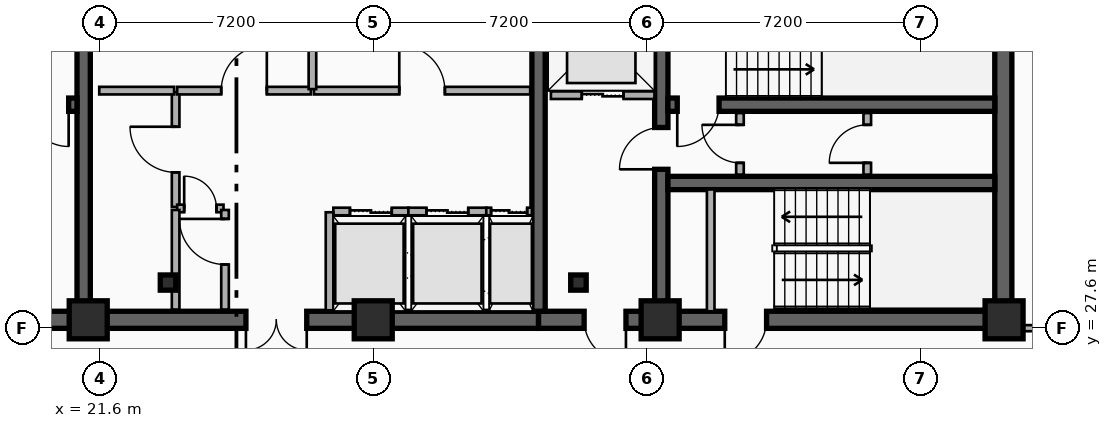
"""IFC4 building model, lengths in metres.
Left out: names, types, materials, properties, quantities, classifications, styles, units other than length and angle.
Written with IfcOpenShell. Run it as: python <this file> out.ifc"""

import sys

from ifc_helpers import new_model, si_unit, direction, frame, frame_2d, origin, origin_2d, place, context, subcontext, project, spatial, rectangle, i_section, extrude, element, fill, save


model = new_model("IFC4")
c1 = context("Model", 3, precision=1e-05, world=origin(), true_north=direction((0.0, 1.0)))
c2 = subcontext(c1, "Body", "Model", "MODEL_VIEW")
j1 = project(units=[si_unit("LENGTHUNIT", "METRE"), si_unit("PLANEANGLEUNIT", "RADIAN")], contexts=[c1])
p1 = place(None, origin())
s1 = spatial("IfcSite", under=j1, at=p1, CompositionType="ELEMENT")
p2 = place(p1, origin())
s2 = spatial("IfcBuilding", under=s1, at=p2, CompositionType="ELEMENT")
p3 = place(p2, frame((0.0, 0.0, 207.6)))
s3 = spatial("IfcBuildingStorey", under=s2, at=p3, CompositionType="ELEMENT", Elevation=207.6)
p4 = place(p3, frame((21.18, 27.82, 0.0), z_axis=(0.0, 0.0, 1.0), x_axis=(-1.0, 0.0, 0.0)))
e1 = element("IfcWall", 1, at=p4, inside=s3, PredefinedType="SHEAR", context=c2, shape_type="SweptSolid", body=[
    extrude(rectangle(XDim=9.03, YDim=0.45, at=frame_2d((4.515, 0.0))), origin(), (0.0, 0.0, 1.0), 3.6),
])
p5 = place(p4, frame((2.68, 0.0, 0.0)))
e2 = element("IfcOpeningElement", 2, at=p5, cuts=e1, PredefinedType="OPENING", context=c2, shape_type="SweptSolid", body=[
    extrude(rectangle(XDim=1.1, YDim=2.15, at=frame_2d((0.55, 1.075))), frame((0.0, 0.235, 0.0), z_axis=(0.0, -1.0, 0.0), x_axis=(1.0, 0.0, 0.0)), (0.0, 0.0, 1.0), 0.47),
])
p6 = place(p3, frame((33.15, 27.82, 0.0), z_axis=(0.0, 0.0, 1.0), x_axis=(-1.0, 0.0, 0.0)))
e3 = element("IfcWall", 3, at=p6, inside=s3, PredefinedType="SHEAR", context=c2, shape_type="SweptSolid", body=[
    extrude(rectangle(XDim=11.97, YDim=0.45, at=frame_2d((5.985, 0.0))), origin(), (0.0, 0.0, 1.0), 3.6),
])
p7 = place(p6, frame((6.1, 0.0, 0.0)))
e4 = element("IfcOpeningElement", 4, at=p7, cuts=e3, PredefinedType="OPENING", context=c2, shape_type="SweptSolid", body=[
    extrude(rectangle(XDim=1.6, YDim=2.2, at=frame_2d((0.8, 1.1))), frame((0.0, 0.235, 0.0), z_axis=(0.0, -1.0, 0.0), x_axis=(1.0, 0.0, 0.0)), (0.0, 0.0, 1.0), 0.47),
])
p8 = place(p3, frame((45.38, 27.82, 0.0), z_axis=(0.0, 0.0, 1.0), x_axis=(-1.0, 0.0, 0.0)))
e5 = element("IfcWall", 5, at=p8, inside=s3, PredefinedType="SHEAR", context=c2, shape_type="SweptSolid", body=[
    extrude(rectangle(XDim=12.23, YDim=0.45, at=frame_2d((6.115, 0.0))), origin(), (0.0, 0.0, 1.0), 3.6),
])
p9 = place(p8, frame((9.93, 0.0, 0.0)))
e6 = element("IfcOpeningElement", 6, at=p9, cuts=e5, PredefinedType="OPENING", context=c2, shape_type="SweptSolid", body=[
    extrude(rectangle(XDim=1.1, YDim=2.15, at=frame_2d((0.55, 1.075))), frame((0.0, 0.235, 0.0), z_axis=(0.0, -1.0, 0.0), x_axis=(1.0, 0.0, 0.0)), (0.0, 0.0, 1.0), 0.47),
])
p10 = place(p8, frame((6.23, 0.0, 0.0)))
e7 = element("IfcOpeningElement", 7, at=p10, cuts=e5, PredefinedType="OPENING", context=c2, shape_type="SweptSolid", body=[
    extrude(rectangle(XDim=1.1, YDim=2.15, at=frame_2d((0.55, 1.075))), frame((0.0, 0.235, 0.0), z_axis=(0.0, -1.0, 0.0), x_axis=(1.0, 0.0, 0.0)), (0.0, 0.0, 1.0), 0.47),
])
p11 = place(p3, frame((45.38, 28.045, 0.0), z_axis=(0.0, 0.0, 1.0), x_axis=(0.0, 1.0, 0.0)))
e8 = element("IfcWall", 8, at=p11, inside=s3, PredefinedType="SHEAR", context=c2, shape_type="SweptSolid", body=[
    extrude(rectangle(XDim=8.78, YDim=0.45, at=frame_2d((4.39, 0.0))), origin(), (0.0, 0.0, 1.0), 3.6),
])
for number, where, z_axis, x_axis in (
    (9, (21.18, 28.045, 0.0), (0.0, 0.0, 1.0), (0.0, 1.0, 0.0)),
    (10, (33.15, 28.045, 0.0), (0.0, 0.0, 1.0), (0.0, 1.0, 0.0)),
):
    element("IfcWall", number, at=place(p3, frame(where, z_axis=z_axis, x_axis=x_axis)), inside=s3, PredefinedType="SHEAR", context=c2, shape_type="SweptSolid", body=[
        extrude(rectangle(XDim=8.78, YDim=0.35, at=frame_2d((4.39, 0.0))), origin(), (0.0, 0.0, 1.0), 3.6),
    ])
p12 = place(p3, frame((36.38, 28.045, 0.0), z_axis=(0.0, 0.0, 1.0), x_axis=(0.0, 1.0, 0.0)))
e11 = element("IfcWall", 11, at=p12, inside=s3, PredefinedType="SHEAR", context=c2, shape_type="SweptSolid", body=[
    extrude(rectangle(XDim=8.78, YDim=0.35, at=frame_2d((4.39, 0.0))), origin(), (0.0, 0.0, 1.0), 3.6),
])
p13 = place(p12, frame((3.735, 0.0, 0.0)))
e12 = element("IfcOpeningElement", 12, at=p13, cuts=e11, PredefinedType="OPENING", context=c2, shape_type="SweptSolid", body=[
    extrude(rectangle(XDim=1.1, YDim=2.15, at=frame_2d((0.55, 1.075))), frame((0.0, 0.185, 0.0), z_axis=(0.0, -1.0, 0.0), x_axis=(1.0, 0.0, 0.0)), (0.0, 0.0, 1.0), 0.37),
])
p14 = place(p3, frame((21.005, 33.48, 0.0), z_axis=(0.0, 0.0, 1.0), x_axis=(-1.0, 0.0, 0.0)))
e13 = element("IfcWall", 13, at=p14, inside=s3, PredefinedType="SHEAR", context=c2, shape_type="SweptSolid", body=[
    extrude(rectangle(XDim=8.63, YDim=0.35, at=frame_2d((4.315, 0.0))), origin(), (0.0, 0.0, 1.0), 3.6),
])
p15 = place(p14, frame((0.22, 0.0, 0.0)))
e14 = element("IfcOpeningElement", 14, at=p15, cuts=e13, PredefinedType="OPENING", context=c2, shape_type="SweptSolid", body=[
    extrude(rectangle(XDim=1.1, YDim=2.15, at=frame_2d((0.55, 1.075))), frame((0.0, 0.185, 0.0), z_axis=(0.0, -1.0, 0.0), x_axis=(1.0, 0.0, 0.0)), (0.0, 0.0, 1.0), 0.37),
])
p16 = place(p3, frame((45.155, 33.48, 0.0), z_axis=(0.0, 0.0, 1.0), x_axis=(-1.0, 0.0, 0.0)))
e15 = element("IfcWall", 15, at=p16, inside=s3, PredefinedType="SHEAR", context=c2, shape_type="SweptSolid", body=[
    extrude(rectangle(XDim=8.6, YDim=0.35, at=frame_2d((4.3, 0.0))), origin(), (0.0, 0.0, 1.0), 3.6),
])
p17 = place(p16, frame((7.255, 0.0, 0.0)))
e16 = element("IfcOpeningElement", 16, at=p17, cuts=e15, PredefinedType="OPENING", context=c2, shape_type="SweptSolid", body=[
    extrude(rectangle(XDim=1.1, YDim=2.15, at=frame_2d((0.55, 1.075))), frame((0.0, 0.185, 0.0), z_axis=(0.0, -1.0, 0.0), x_axis=(1.0, 0.0, 0.0)), (0.0, 0.0, 1.0), 0.37),
])
p18 = place(p3, frame((36.555, 31.42, 0.0), z_axis=(0.0, 0.0, 1.0), x_axis=(1.0, 0.0, 0.0)))
e17 = element("IfcWall", 17, at=p18, inside=s3, PredefinedType="SHEAR", context=c2, shape_type="SweptSolid", body=[
    extrude(rectangle(XDim=8.6, YDim=0.35, at=frame_2d((4.3, 0.0))), origin(), (0.0, 0.0, 1.0), 3.6),
])
for number, where, z_axis, x_axis in (
    (18, (23.4, 28.8, 0.0), (0.0, 0.0, 1.0), (1.0, 0.0, 0.0)),
    (19, (34.2, 28.8, 0.0), (0.0, 0.0, 1.0), (1.0, 0.0, 0.0)),
):
    element("IfcColumn", number, at=place(p3, frame(where, z_axis=z_axis, x_axis=x_axis)), inside=s3, PredefinedType="COLUMN", context=c2, shape_type="SweptSolid", body=[
        extrude(i_section(OverallWidth=0.408, OverallDepth=0.4, WebThickness=0.025, FlangeThickness=0.039, FilletRadius=0.015, at=origin_2d()), origin(), (0.0, 0.0, 1.0), 3.6),
    ])
for number, where, z_axis, x_axis in (
    (20, (21.3, 27.82, 0.0), (0.0, 0.0, 1.0), (1.0, 0.0, 0.0)),
    (21, (28.8, 27.82, 0.0), (0.0, 0.0, 1.0), (1.0, 0.0, 0.0)),
    (22, (36.35, 27.82, 0.0), (0.0, 0.0, 1.0), (1.0, 0.0, 0.0)),
    (23, (45.4, 27.82, 0.0), (0.0, 0.0, 1.0), (1.0, 0.0, 0.0)),
):
    element("IfcColumn", number, at=place(p3, frame(where, z_axis=z_axis, x_axis=x_axis)), inside=s3, PredefinedType="COLUMN", context=c2, shape_type="SweptSolid", body=[
        extrude(rectangle(XDim=1.0, YDim=1.0, at=origin_2d()), origin(), (0.0, 0.0, 1.0), 3.6),
    ])
p19 = place(p3, frame((33.475, 33.73, 0.0), z_axis=(0.0, 0.0, 1.0), x_axis=(1.0, 0.0, 0.0)))
e24 = element("IfcWall", 24, at=p19, inside=s3, PredefinedType="PARTITIONING", context=c2, shape_type="SweptSolid", body=[
    extrude(rectangle(XDim=2.725, YDim=0.2, at=frame_2d((1.362, 0.0))), origin(), (0.0, 0.0, 1.0), 2.41),
])
p20 = place(p19, frame((0.812, 0.0, 0.0)))
e25 = element("IfcOpeningElement", 25, at=p20, cuts=e24, PredefinedType="OPENING", context=c2, shape_type="SweptSolid", body=[
    extrude(rectangle(XDim=1.1, YDim=2.15, at=frame_2d((0.55, 1.075))), frame((0.0, 0.11, 0.0), z_axis=(0.0, -1.0, 0.0), x_axis=(1.0, 0.0, 0.0)), (0.0, 0.0, 1.0), 0.22),
])
p21 = place(p3, frame((27.75, 30.67, 0.0), z_axis=(0.0, 0.0, 1.0), x_axis=(1.0, 0.0, 0.0)))
e26 = element("IfcWall", 26, at=p21, inside=s3, PredefinedType="PARTITIONING", context=c2, shape_type="SweptSolid", body=[
    extrude(rectangle(XDim=1.975, YDim=0.2, at=frame_2d((0.988, 0.0))), origin(), (0.0, 0.0, 1.0), 2.41),
])
p22 = place(p21, frame((0.438, 0.0, 0.0)))
e27 = element("IfcOpeningElement", 27, at=p22, cuts=e26, PredefinedType="OPENING", context=c2, shape_type="SweptSolid", body=[
    extrude(rectangle(XDim=1.1, YDim=2.15, at=frame_2d((0.55, 1.075))), frame((0.0, 0.11, 0.0), z_axis=(0.0, -1.0, 0.0), x_axis=(1.0, 0.0, 0.0)), (0.0, 0.0, 1.0), 0.22),
])
p23 = place(p3, frame((27.65, 28.07, 0.0), z_axis=(0.0, 0.0, 1.0), x_axis=(0.0, 1.0, 0.0)))
e28 = element("IfcWall", 28, at=p23, inside=s3, PredefinedType="PARTITIONING", context=c2, shape_type="SweptSolid", body=[
    extrude(rectangle(XDim=2.58, YDim=0.2, at=frame_2d((1.29, 0.0))), origin(), (0.0, 0.0, 1.0), 2.41),
])
p24 = place(p3, frame((29.725, 30.67, 0.0), z_axis=(0.0, 0.0, 1.0), x_axis=(1.0, 0.0, 0.0)))
e29 = element("IfcWall", 29, at=p24, inside=s3, PredefinedType="PARTITIONING", context=c2, shape_type="SweptSolid", body=[
    extrude(rectangle(XDim=2.05, YDim=0.2, at=frame_2d((1.025, 0.0))), origin(), (0.0, 0.0, 1.0), 2.72),
])
p25 = place(p24, frame((0.475, 0.0, 0.0)))
e30 = element("IfcOpeningElement", 30, at=p25, cuts=e29, PredefinedType="OPENING", context=c2, shape_type="SweptSolid", body=[
    extrude(rectangle(XDim=1.1, YDim=2.15, at=frame_2d((0.55, 1.075))), frame((0.0, 0.11, 0.0), z_axis=(0.0, -1.0, 0.0), x_axis=(1.0, 0.0, 0.0)), (0.0, 0.0, 1.0), 0.22),
])
p26 = place(p3, frame((31.775, 30.67, 0.0), z_axis=(0.0, 0.0, 1.0), x_axis=(1.0, 0.0, 0.0)))
e31 = element("IfcWall", 31, at=p26, inside=s3, PredefinedType="PARTITIONING", context=c2, shape_type="SweptSolid", body=[
    extrude(rectangle(XDim=1.2, YDim=0.2, at=frame_2d((0.6, 0.0))), origin(), (0.0, 0.0, 1.0), 2.72),
])
p27 = place(p26, frame((0.125, 0.0, 0.0)))
e32 = element("IfcOpeningElement", 32, at=p27, cuts=e31, PredefinedType="OPENING", context=c2, shape_type="SweptSolid", body=[
    extrude(rectangle(XDim=0.95, YDim=2.15, at=frame_2d((0.475, 1.075))), frame((0.0, 0.11, 0.0), z_axis=(0.0, -1.0, 0.0), x_axis=(1.0, 0.0, 0.0)), (0.0, 0.0, 1.0), 0.22),
])
p28 = place(p3, frame((37.68, 28.045, 0.0), z_axis=(0.0, 0.0, 1.0), x_axis=(0.0, 1.0, 0.0)))
e33 = element("IfcWall", 33, at=p28, inside=s3, PredefinedType="PARTITIONING", context=c2, shape_type="SweptSolid", body=[
    extrude(rectangle(XDim=3.205, YDim=0.2, at=frame_2d((1.603, 0.0))), origin(), (0.0, 0.0, 1.0), 2.72),
])
p29 = place(p3, frame((38.45, 31.64, 0.0), z_axis=(0.0, 0.0, 1.0), x_axis=(0.0, 1.0, 0.0)))
e34 = element("IfcWall", 34, at=p29, inside=s3, PredefinedType="PARTITIONING", context=c2, shape_type="SweptSolid", body=[
    extrude(rectangle(XDim=1.62, YDim=0.2, at=frame_2d((0.81, 0.0))), origin(), (0.0, 0.0, 1.0), 3.34),
])
p30 = place(p29, frame((0.31, 0.0, 0.0)))
e35 = element("IfcOpeningElement", 35, at=p30, cuts=e34, PredefinedType="OPENING", context=c2, shape_type="SweptSolid", body=[
    extrude(rectangle(XDim=1.0, YDim=2.15, at=frame_2d((0.5, 1.075))), frame((0.0, 0.11, 0.0), z_axis=(0.0, -1.0, 0.0), x_axis=(1.0, 0.0, 0.0)), (0.0, 0.0, 1.0), 0.22),
])
p31 = place(p3, frame((41.8, 31.64, 0.0), z_axis=(0.0, 0.0, 1.0), x_axis=(0.0, 1.0, 0.0)))
e36 = element("IfcWall", 36, at=p31, inside=s3, PredefinedType="PARTITIONING", context=c2, shape_type="SweptSolid", body=[
    extrude(rectangle(XDim=1.62, YDim=0.2, at=frame_2d((0.81, 0.0))), origin(), (0.0, 0.0, 1.0), 3.34),
])
p32 = place(p31, frame((0.31, 0.0, 0.0)))
e37 = element("IfcOpeningElement", 37, at=p32, cuts=e36, PredefinedType="OPENING", context=c2, shape_type="SweptSolid", body=[
    extrude(rectangle(XDim=1.0, YDim=2.15, at=frame_2d((0.5, 1.075))), frame((0.0, 0.11, 0.0), z_axis=(0.0, -1.0, 0.0), x_axis=(1.0, 0.0, 0.0)), (0.0, 0.0, 1.0), 0.22),
])
p33 = place(p3, frame((23.6, 30.79, 0.0), z_axis=(0.0, 0.0, 1.0), x_axis=(0.0, 1.0, 0.0)))
e38 = element("IfcWall", 38, at=p33, inside=s3, PredefinedType="PARTITIONING", context=c2, shape_type="SweptSolid", body=[
    extrude(rectangle(XDim=3.02, YDim=0.2, at=frame_2d((1.51, 0.0))), origin(), (0.0, 0.0, 1.0), 3.34),
])
p34 = place(p33, frame((0.91, 0.0, 0.0)))
e39 = element("IfcOpeningElement", 39, at=p34, cuts=e38, PredefinedType="OPENING", context=c2, shape_type="SweptSolid", body=[
    extrude(rectangle(XDim=1.2, YDim=2.15, at=frame_2d((0.6, 1.075))), frame((0.0, 0.11, 0.0), z_axis=(0.0, -1.0, 0.0), x_axis=(1.0, 0.0, 0.0)), (0.0, 0.0, 1.0), 0.22),
])
p35 = place(p3, frame((23.64, 30.75, 0.0), z_axis=(0.0, 0.0, 1.0), x_axis=(1.0, 0.0, 0.0)))
e40 = element("IfcWall", 40, at=p35, inside=s3, PredefinedType="PARTITIONING", context=c2, shape_type="SweptSolid", body=[
    extrude(rectangle(XDim=1.22, YDim=0.2, at=frame_2d((0.61, 0.0))), origin(), (0.0, 0.0, 1.0), 3.34),
])
p36 = place(p35, frame((0.185, 0.0, 0.0)))
e41 = element("IfcOpeningElement", 41, at=p36, cuts=e40, PredefinedType="OPENING", context=c2, shape_type="SweptSolid", body=[
    extrude(rectangle(XDim=0.85, YDim=2.1, at=frame_2d((0.425, 1.05))), frame((0.0, 0.11, 0.0), z_axis=(0.0, -1.0, 0.0), x_axis=(1.0, 0.0, 0.0)), (0.0, 0.0, 1.0), 0.22),
])
p37 = place(p3, frame((23.64, 33.85, 0.0), z_axis=(0.0, 0.0, 1.0), x_axis=(1.0, 0.0, 0.0)))
e42 = element("IfcWall", 42, at=p37, inside=s3, PredefinedType="PARTITIONING", context=c2, shape_type="SweptSolid", body=[
    extrude(rectangle(XDim=3.52, YDim=0.2, at=frame_2d((1.76, 0.0))), origin(), (0.0, 0.0, 1.0), 3.34),
])
p38 = place(p37, frame((1.16, 0.0, 0.0)))
e43 = element("IfcOpeningElement", 43, at=p38, cuts=e42, PredefinedType="OPENING", context=c2, shape_type="SweptSolid", body=[
    extrude(rectangle(XDim=1.2, YDim=2.15, at=frame_2d((0.6, 1.075))), frame((0.0, 0.11, 0.0), z_axis=(0.0, -1.0, 0.0), x_axis=(1.0, 0.0, 0.0)), (0.0, 0.0, 1.0), 0.22),
])
p39 = place(p3, frame((27.24, 33.85, 0.0), z_axis=(0.0, 0.0, 1.0), x_axis=(1.0, 0.0, 0.0)))
e44 = element("IfcWall", 44, at=p39, inside=s3, PredefinedType="PARTITIONING", context=c2, shape_type="SweptSolid", body=[
    extrude(rectangle(XDim=5.69, YDim=0.2, at=frame_2d((2.845, 0.0))), origin(), (0.0, 0.0, 1.0), 2.41),
])
p40 = place(p39, frame((2.245, 0.0, 0.0)))
e45 = element("IfcOpeningElement", 45, at=p40, cuts=e44, PredefinedType="OPENING", context=c2, shape_type="SweptSolid", body=[
    extrude(rectangle(XDim=1.2, YDim=2.15, at=frame_2d((0.6, 1.075))), frame((0.0, 0.11, 0.0), z_axis=(0.0, -1.0, 0.0), x_axis=(1.0, 0.0, 0.0)), (0.0, 0.0, 1.0), 0.22),
])
p41 = place(p3, frame((24.9, 28.09, 0.0), z_axis=(0.0, 0.0, 1.0), x_axis=(0.0, 1.0, 0.0)))
e46 = element("IfcWall", 46, at=p41, inside=s3, PredefinedType="PARTITIONING", context=c2, shape_type="SweptSolid", body=[
    extrude(rectangle(XDim=2.62, YDim=0.2, at=frame_2d((1.31, 0.0))), origin(), (0.0, 0.0, 1.0), 2.72),
])
p42 = place(p41, frame((1.185, 0.0, 0.0)))
e47 = element("IfcOpeningElement", 47, at=p42, cuts=e46, PredefinedType="OPENING", context=c2, shape_type="SweptSolid", body=[
    extrude(rectangle(XDim=1.2, YDim=2.15, at=frame_2d((0.6, 1.075))), frame((0.0, 0.11, 0.0), z_axis=(0.0, -1.0, 0.0), x_axis=(1.0, 0.0, 0.0)), (0.0, 0.0, 1.0), 0.22),
])
p43 = place(p3, frame((23.6, 28.09, 0.0), z_axis=(0.0, 0.0, 1.0), x_axis=(0.0, 1.0, 0.0)))
e48 = element("IfcWall", 48, at=p43, inside=s3, PredefinedType="PARTITIONING", context=c2, shape_type="SweptSolid", body=[
    extrude(rectangle(XDim=2.62, YDim=0.2, at=frame_2d((1.31, 0.0))), origin(), (0.0, 0.0, 1.0), 2.72),
])
p44 = place(p3, frame((21.59, 33.85, 0.0), z_axis=(0.0, 0.0, 1.0), x_axis=(1.0, 0.0, 0.0)))
e49 = element("IfcWall", 49, at=p44, inside=s3, PredefinedType="PARTITIONING", context=c2, shape_type="SweptSolid", body=[
    extrude(rectangle(XDim=1.97, YDim=0.2, at=frame_2d((0.985, 0.0))), origin(), (0.0, 0.0, 1.0), 2.41),
])
p45 = place(p3, frame((27.2, 33.89, 0.0), z_axis=(0.0, 0.0, 1.0), x_axis=(0.0, 1.0, 0.0)))
e50 = element("IfcWall", 50, at=p45, inside=s3, PredefinedType="PARTITIONING", context=c2, shape_type="SweptSolid", body=[
    extrude(rectangle(XDim=2.72, YDim=0.2, at=frame_2d((1.36, 0.0))), origin(), (0.0, 0.0, 1.0), 3.34),
])
p46 = place(p3, frame((45.41, 27.6, 0.0), z_axis=(0.0, 0.0, 1.0), x_axis=(1.0, 0.0, 0.0)))
e51 = element("IfcWall", 51, at=p46, inside=s3, PredefinedType="PARTITIONING", context=c2, shape_type="SweptSolid", body=[
    extrude(rectangle(XDim=0.91, YDim=0.16, at=frame_2d((0.455, 0.0))), origin(), (0.0, 0.0, 1.0), 2.41),
])
p47 = place(p20, origin())
e52 = element("IfcDoor", 52, at=p47, inside=s3, OperationType="DOUBLE_DOOR_SLIDING", PredefinedType="DOOR", context=c2, shape_type="SweptSolid", body=[
    extrude(rectangle(XDim=1.1, YDim=2.15, at=frame_2d((0.55, 1.075))), frame((0.0, 0.025, 0.0), z_axis=(0.0, -1.0, 0.0), x_axis=(1.0, 0.0, 0.0)), (0.0, 0.0, 1.0), 0.05),
])
fill(e25, e52)
p48 = place(p22, origin())
e53 = element("IfcDoor", 53, at=p48, inside=s3, OperationType="DOUBLE_DOOR_SLIDING", PredefinedType="DOOR", context=c2, shape_type="SweptSolid", body=[
    extrude(rectangle(XDim=1.1, YDim=2.15, at=frame_2d((0.55, 1.075))), frame((0.0, 0.025, 0.0), z_axis=(0.0, -1.0, 0.0), x_axis=(1.0, 0.0, 0.0)), (0.0, 0.0, 1.0), 0.05),
])
fill(e27, e53)
p49 = place(p25, origin())
e54 = element("IfcDoor", 54, at=p49, inside=s3, OperationType="DOUBLE_DOOR_SLIDING", PredefinedType="DOOR", context=c2, shape_type="SweptSolid", body=[
    extrude(rectangle(XDim=1.1, YDim=2.15, at=frame_2d((0.55, 1.075))), frame((0.0, 0.025, 0.0), z_axis=(0.0, -1.0, 0.0), x_axis=(1.0, 0.0, 0.0)), (0.0, 0.0, 1.0), 0.05),
])
fill(e30, e54)
p50 = place(p27, origin())
e55 = element("IfcDoor", 55, at=p50, inside=s3, OperationType="DOUBLE_DOOR_SLIDING", PredefinedType="DOOR", context=c2, shape_type="SweptSolid", body=[
    extrude(rectangle(XDim=0.95, YDim=2.15, at=frame_2d((0.475, 1.075))), frame((0.0, 0.025, 0.0), z_axis=(0.0, -1.0, 0.0), x_axis=(1.0, 0.0, 0.0)), (0.0, 0.0, 1.0), 0.05),
])
fill(e32, e55)
p51 = place(p15, origin())
e56 = element("IfcDoor", 56, at=p51, inside=s3, OperationType="SINGLE_SWING_LEFT", PredefinedType="DOOR", context=c2, shape_type="SweptSolid", body=[
    extrude(rectangle(XDim=1.1, YDim=2.15, at=frame_2d((0.55, 1.075))), frame((0.0, 0.025, 0.0), z_axis=(0.0, -1.0, 0.0), x_axis=(1.0, 0.0, 0.0)), (0.0, 0.0, 1.0), 0.05),
])
fill(e14, e56)
p52 = place(p17, origin())
e57 = element("IfcDoor", 57, at=p52, inside=s3, OperationType="SINGLE_SWING_RIGHT", PredefinedType="DOOR", context=c2, shape_type="SweptSolid", body=[
    extrude(rectangle(XDim=1.1, YDim=2.15, at=frame_2d((0.55, 1.075))), frame((0.0, 0.025, 0.0), z_axis=(0.0, -1.0, 0.0), x_axis=(1.0, 0.0, 0.0)), (0.0, 0.0, 1.0), 0.05),
])
fill(e16, e57)
p53 = place(p13, origin())
e58 = element("IfcDoor", 58, at=p53, inside=s3, OperationType="SINGLE_SWING_LEFT", PredefinedType="DOOR", context=c2, shape_type="SweptSolid", body=[
    extrude(rectangle(XDim=1.1, YDim=2.15, at=frame_2d((0.55, 1.075))), frame((0.0, 0.025, 0.0), z_axis=(0.0, -1.0, 0.0), x_axis=(1.0, 0.0, 0.0)), (0.0, 0.0, 1.0), 0.05),
])
fill(e12, e58)
p54 = place(p9, origin())
e59 = element("IfcDoor", 59, at=p54, inside=s3, OperationType="SINGLE_SWING_LEFT", PredefinedType="DOOR", context=c2, shape_type="SweptSolid", body=[
    extrude(rectangle(XDim=1.1, YDim=2.15, at=frame_2d((0.55, 1.075))), frame((0.0, 0.025, 0.0), z_axis=(0.0, -1.0, 0.0), x_axis=(1.0, 0.0, 0.0)), (0.0, 0.0, 1.0), 0.05),
])
fill(e6, e59)
p55 = place(p10, origin())
e60 = element("IfcDoor", 60, at=p55, inside=s3, OperationType="SINGLE_SWING_RIGHT", PredefinedType="DOOR", context=c2, shape_type="SweptSolid", body=[
    extrude(rectangle(XDim=1.1, YDim=2.15, at=frame_2d((0.55, 1.075))), frame((0.0, 0.025, 0.0), z_axis=(0.0, -1.0, 0.0), x_axis=(1.0, 0.0, 0.0)), (0.0, 0.0, 1.0), 0.05),
])
fill(e7, e60)
p56 = place(p7, origin())
e61 = element("IfcDoor", 61, at=p56, inside=s3, OperationType="SINGLE_SWING_LEFT", PredefinedType="DOOR", context=c2, shape_type="SweptSolid", body=[
    extrude(rectangle(XDim=1.6, YDim=2.2, at=frame_2d((0.8, 1.1))), frame((0.0, 0.025, 0.0), z_axis=(0.0, -1.0, 0.0), x_axis=(1.0, 0.0, 0.0)), (0.0, 0.0, 1.0), 0.05),
])
fill(e4, e61)
p57 = place(p30, origin())
e62 = element("IfcDoor", 62, at=p57, inside=s3, OperationType="SINGLE_SWING_RIGHT", PredefinedType="DOOR", context=c2, shape_type="SweptSolid", body=[
    extrude(rectangle(XDim=1.0, YDim=2.15, at=frame_2d((0.5, 1.075))), frame((0.0, 0.025, 0.0), z_axis=(0.0, -1.0, 0.0), x_axis=(1.0, 0.0, 0.0)), (0.0, 0.0, 1.0), 0.05),
])
fill(e35, e62)
p58 = place(p32, origin())
e63 = element("IfcDoor", 63, at=p58, inside=s3, OperationType="SINGLE_SWING_LEFT", PredefinedType="DOOR", context=c2, shape_type="SweptSolid", body=[
    extrude(rectangle(XDim=1.0, YDim=2.15, at=frame_2d((0.5, 1.075))), frame((0.0, 0.025, 0.0), z_axis=(0.0, -1.0, 0.0), x_axis=(1.0, 0.0, 0.0)), (0.0, 0.0, 1.0), 0.05),
])
fill(e37, e63)
p59 = place(p34, origin())
e64 = element("IfcDoor", 64, at=p59, inside=s3, OperationType="SINGLE_SWING_RIGHT", PredefinedType="DOOR", context=c2, shape_type="SweptSolid", body=[
    extrude(rectangle(XDim=1.2, YDim=2.15, at=frame_2d((0.6, 1.075))), frame((0.0, 0.025, 0.0), z_axis=(0.0, -1.0, 0.0), x_axis=(1.0, 0.0, 0.0)), (0.0, 0.0, 1.0), 0.05),
])
fill(e39, e64)
p60 = place(p36, origin())
e65 = element("IfcDoor", 65, at=p60, inside=s3, OperationType="SINGLE_SWING_LEFT", PredefinedType="DOOR", context=c2, shape_type="SweptSolid", body=[
    extrude(rectangle(XDim=0.85, YDim=2.1, at=frame_2d((0.425, 1.05))), frame((0.0, 0.025, 0.0), z_axis=(0.0, -1.0, 0.0), x_axis=(1.0, 0.0, 0.0)), (0.0, 0.0, 1.0), 0.05),
])
fill(e41, e65)
p61 = place(p38, origin())
e66 = element("IfcDoor", 66, at=p61, inside=s3, OperationType="SINGLE_SWING_RIGHT", PredefinedType="DOOR", context=c2, shape_type="SweptSolid", body=[
    extrude(rectangle(XDim=1.2, YDim=2.15, at=frame_2d((0.6, 1.075))), frame((0.0, 0.025, 0.0), z_axis=(0.0, -1.0, 0.0), x_axis=(1.0, 0.0, 0.0)), (0.0, 0.0, 1.0), 0.05),
])
fill(e43, e66)
p62 = place(p40, origin())
e67 = element("IfcDoor", 67, at=p62, inside=s3, OperationType="SINGLE_SWING_LEFT", PredefinedType="DOOR", context=c2, shape_type="SweptSolid", body=[
    extrude(rectangle(XDim=1.2, YDim=2.15, at=frame_2d((0.6, 1.075))), frame((0.0, 0.025, 0.0), z_axis=(0.0, -1.0, 0.0), x_axis=(1.0, 0.0, 0.0)), (0.0, 0.0, 1.0), 0.05),
])
fill(e45, e67)
p63 = place(p42, origin())
e68 = element("IfcDoor", 68, at=p63, inside=s3, OperationType="SINGLE_SWING_RIGHT", PredefinedType="DOOR", context=c2, shape_type="SweptSolid", body=[
    extrude(rectangle(XDim=1.2, YDim=2.15, at=frame_2d((0.6, 1.075))), frame((0.0, 0.025, 0.0), z_axis=(0.0, -1.0, 0.0), x_axis=(1.0, 0.0, 0.0)), (0.0, 0.0, 1.0), 0.05),
])
fill(e47, e68)
save(model, sys.argv[1])
